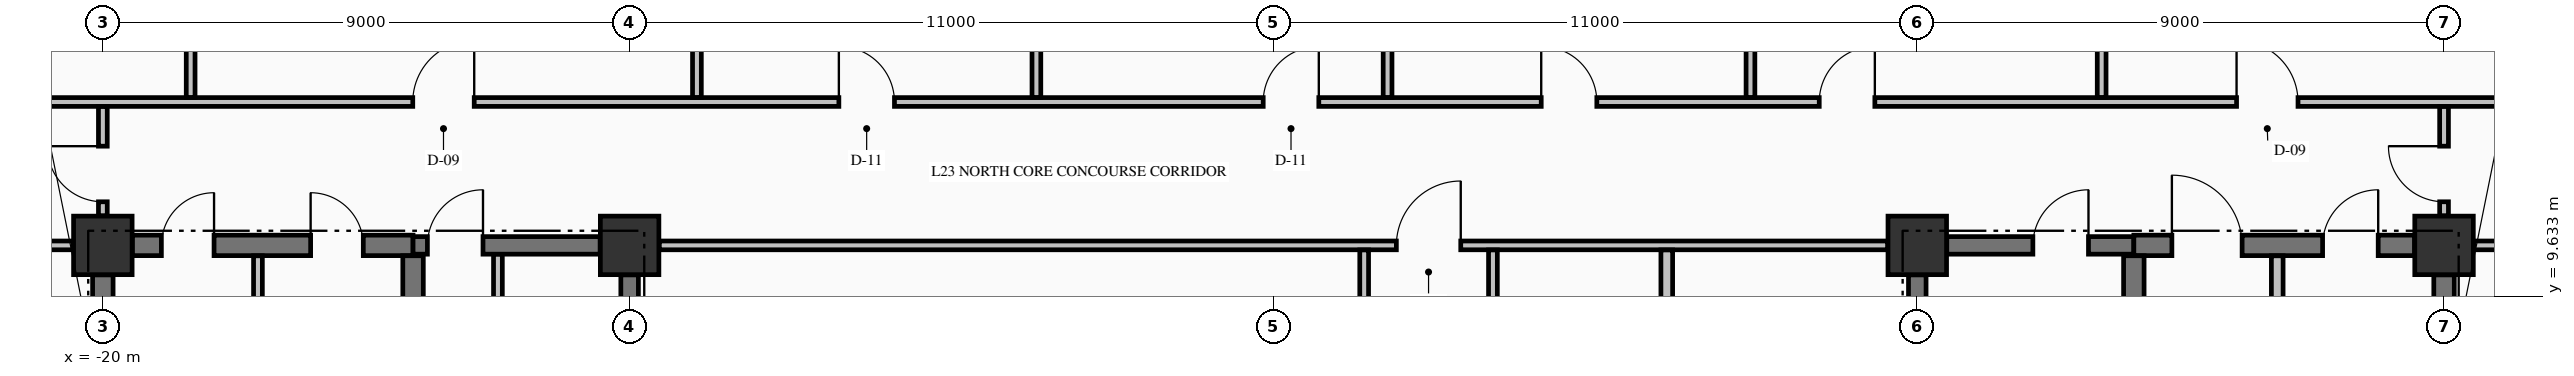
"""IFC4 building model, lengths in metres.
Left out: names, types, materials, properties, quantities, classifications, styles, units other than length and angle.
Written with IfcOpenShell. Run it as: python <this file> out.ifc"""

import sys

from ifc_helpers import new_model, si_unit, direction, frame, frame_2d, origin, origin_2d, place, context, subcontext, project, spatial, rectangle, extrude, element, fill, save


model = new_model("IFC4")
c1 = context("Model", 3, precision=1e-05, world=origin(), true_north=direction((0.0, 1.0)))
c2 = subcontext(c1, "Body", "Model", "MODEL_VIEW")
j1 = project(units=[si_unit("LENGTHUNIT", "METRE"), si_unit("PLANEANGLEUNIT", "RADIAN")], contexts=[c1])
p1 = place(None, origin())
s1 = spatial("IfcSite", under=j1, at=p1, CompositionType="ELEMENT")
p2 = place(p1, origin())
s2 = spatial("IfcBuilding", under=s1, at=p2, CompositionType="ELEMENT")
p3 = place(p2, frame((0.0, 0.0, 94.93)))
s3 = spatial("IfcBuildingStorey", under=s2, at=p3, CompositionType="ELEMENT", Elevation=94.93)
for number, where, z_axis, x_axis in (
    (1, (-20.0, 10.5, -0.25), (0.0, 0.0, 1.0), (1.0, 0.0, 0.0)),
    (2, (-11.0, 10.5, -0.25), (0.0, 0.0, 1.0), (1.0, 0.0, 0.0)),
    (3, (11.0, 10.5, -0.25), (0.0, 0.0, 1.0), (1.0, 0.0, 0.0)),
    (4, (20.0, 10.5, -0.25), (0.0, 0.0, 1.0), (1.0, 0.0, 0.0)),
):
    element("IfcColumn", number, at=place(p3, frame(where, z_axis=z_axis, x_axis=x_axis)), inside=s3, PredefinedType="COLUMN", context=c2, shape_type="SweptSolid", body=[
        extrude(rectangle(XDim=1.0, YDim=1.0, at=origin_2d()), origin(), (0.0, 0.0, 1.0), 3.545),
    ])
p4 = place(p3, frame((-19.496, 10.5, 0.0), z_axis=(0.0, 0.0, 1.0), x_axis=(1.0, 0.0, 0.0)))
e5 = element("IfcWall", 5, at=p4, inside=s3, PredefinedType="SHEAR", context=c2, shape_type="SweptSolid", body=[
    extrude(rectangle(XDim=4.796, YDim=0.35, at=frame_2d((2.398, 0.0))), origin(), (0.0, 0.0, 1.0), 3.295),
])
p5 = place(p4, frame((0.496, 0.0, 0.0)))
e6 = element("IfcOpeningElement", 6, at=p5, cuts=e5, PredefinedType="OPENING", context=c2, shape_type="SweptSolid", body=[
    extrude(rectangle(XDim=0.9, YDim=2.15, at=frame_2d((0.45, 1.075))), frame((0.0, 0.185, 0.0), z_axis=(0.0, -1.0, 0.0), x_axis=(1.0, 0.0, 0.0)), (0.0, 0.0, 1.0), 0.37),
])
p6 = place(p4, frame((3.046, 0.0, 0.0)))
e7 = element("IfcOpeningElement", 7, at=p6, cuts=e5, PredefinedType="OPENING", context=c2, shape_type="SweptSolid", body=[
    extrude(rectangle(XDim=0.9, YDim=2.15, at=frame_2d((0.45, 1.075))), frame((0.0, 0.185, 0.0), z_axis=(0.0, -1.0, 0.0), x_axis=(1.0, 0.0, 0.0)), (0.0, 0.0, 1.0), 0.37),
])
p7 = place(p3, frame((-14.7, 10.5, 0.0), z_axis=(0.0, 0.0, 1.0), x_axis=(1.0, 0.0, 0.0)))
e8 = element("IfcWall", 8, at=p7, inside=s3, PredefinedType="SHEAR", context=c2, shape_type="SweptSolid", body=[
    extrude(rectangle(XDim=3.196, YDim=0.3, at=frame_2d((1.598, 0.0))), origin(), (0.0, 0.0, 1.0), 3.295),
])
p8 = place(p7, frame((0.245, 0.0, 0.0)))
e9 = element("IfcOpeningElement", 9, at=p8, cuts=e8, PredefinedType="OPENING", context=c2, shape_type="SweptSolid", body=[
    extrude(rectangle(XDim=0.95, YDim=2.15, at=frame_2d((0.475, 1.075))), frame((0.0, 0.16, 0.0), z_axis=(0.0, -1.0, 0.0), x_axis=(1.0, 0.0, 0.0)), (0.0, 0.0, 1.0), 0.32),
])
p9 = place(p3, frame((11.504, 10.5, 0.0), z_axis=(0.0, 0.0, 1.0), x_axis=(1.0, 0.0, 0.0)))
e10 = element("IfcWall", 10, at=p9, inside=s3, PredefinedType="SHEAR", context=c2, shape_type="SweptSolid", body=[
    extrude(rectangle(XDim=3.196, YDim=0.3, at=frame_2d((1.598, 0.0))), origin(), (0.0, 0.0, 1.0), 3.295),
])
p10 = place(p9, frame((1.471, 0.0, 0.0)))
e11 = element("IfcOpeningElement", 11, at=p10, cuts=e10, PredefinedType="OPENING", context=c2, shape_type="SweptSolid", body=[
    extrude(rectangle(XDim=0.95, YDim=2.15, at=frame_2d((0.475, 1.075))), frame((0.0, 0.16, 0.0), z_axis=(0.0, -1.0, 0.0), x_axis=(1.0, 0.0, 0.0)), (0.0, 0.0, 1.0), 0.32),
])
p11 = place(p3, frame((14.7, 10.5, 0.0), z_axis=(0.0, 0.0, 1.0), x_axis=(1.0, 0.0, 0.0)))
e12 = element("IfcWall", 12, at=p11, inside=s3, PredefinedType="SHEAR", context=c2, shape_type="SweptSolid", body=[
    extrude(rectangle(XDim=4.796, YDim=0.35, at=frame_2d((2.398, 0.0))), origin(), (0.0, 0.0, 1.0), 3.295),
])
p12 = place(p11, frame((0.65, 0.0, 0.0)))
e13 = element("IfcOpeningElement", 13, at=p12, cuts=e12, PredefinedType="OPENING", context=c2, shape_type="SweptSolid", body=[
    extrude(rectangle(XDim=1.2, YDim=2.15, at=frame_2d((0.6, 1.075))), frame((0.0, 0.185, 0.0), z_axis=(0.0, -1.0, 0.0), x_axis=(1.0, 0.0, 0.0)), (0.0, 0.0, 1.0), 0.37),
])
p13 = place(p11, frame((3.225, 0.0, 0.0)))
e14 = element("IfcOpeningElement", 14, at=p13, cuts=e12, PredefinedType="OPENING", context=c2, shape_type="SweptSolid", body=[
    extrude(rectangle(XDim=0.95, YDim=2.15, at=frame_2d((0.475, 1.075))), frame((0.0, 0.185, 0.0), z_axis=(0.0, -1.0, 0.0), x_axis=(1.0, 0.0, 0.0)), (0.0, 0.0, 1.0), 0.37),
])
p14 = place(p3, frame((-22.835, 10.5, 0.0), z_axis=(0.0, 0.0, 1.0), x_axis=(1.0, 0.0, 0.0)))
e15 = element("IfcWall", 15, at=p14, inside=s3, PredefinedType="PARTITIONING", context=c2, shape_type="SweptSolid", body=[
    extrude(rectangle(XDim=2.329, YDim=0.15, at=frame_2d((1.165, 0.0))), origin(), (0.0, 0.0, 1.0), 3.295),
])
p15 = place(p14, frame((0.835, 0.0, 0.0)))
e16 = element("IfcOpeningElement", 16, at=p15, cuts=e15, PredefinedType="OPENING", context=c2, shape_type="SweptSolid", body=[
    extrude(rectangle(XDim=1.0, YDim=2.15, at=frame_2d((0.5, 1.075))), frame((0.0, 0.085, 0.0), z_axis=(0.0, -1.0, 0.0), x_axis=(1.0, 0.0, 0.0)), (0.0, 0.0, 1.0), 0.17),
])
p16 = place(p3, frame((-10.494, 10.5, 0.0), z_axis=(0.0, 0.0, 1.0), x_axis=(1.0, 0.0, 0.0)))
e17 = element("IfcWall", 17, at=p16, inside=s3, PredefinedType="PARTITIONING", context=c2, shape_type="SweptSolid", body=[
    extrude(rectangle(XDim=20.988, YDim=0.15, at=frame_2d((10.494, 0.0))), origin(), (0.0, 0.0, 1.0), 3.295),
])
p17 = place(p16, frame((12.594, 0.0, 0.0)))
e18 = element("IfcOpeningElement", 18, at=p17, cuts=e17, PredefinedType="OPENING", context=c2, shape_type="SweptSolid", body=[
    extrude(rectangle(XDim=1.1, YDim=2.15, at=frame_2d((0.55, 1.075))), frame((0.0, 0.085, 0.0), z_axis=(0.0, -1.0, 0.0), x_axis=(1.0, 0.0, 0.0)), (0.0, 0.0, 1.0), 0.17),
])
p18 = place(p3, frame((20.506, 10.5, 0.0), z_axis=(0.0, 0.0, 1.0), x_axis=(1.0, 0.0, 0.0)))
e19 = element("IfcWall", 19, at=p18, inside=s3, PredefinedType="PARTITIONING", context=c2, shape_type="SweptSolid", body=[
    extrude(rectangle(XDim=7.329, YDim=0.15, at=frame_2d((3.665, 0.0))), origin(), (0.0, 0.0, 1.0), 3.295),
])
p19 = place(p18, frame((3.019, 0.0, 0.0)))
e20 = element("IfcOpeningElement", 20, at=p19, cuts=e19, PredefinedType="OPENING", context=c2, shape_type="SweptSolid", body=[
    extrude(rectangle(XDim=0.95, YDim=2.15, at=frame_2d((0.475, 1.075))), frame((0.0, 0.085, 0.0), z_axis=(0.0, -1.0, 0.0), x_axis=(1.0, 0.0, 0.0)), (0.0, 0.0, 1.0), 0.17),
])
p20 = place(p3, frame((-22.835, 12.95, 0.0), z_axis=(0.0, 0.0, 1.0), x_axis=(1.0, 0.0, 0.0)))
e21 = element("IfcWall", 21, at=p20, inside=s3, PredefinedType="PARTITIONING", context=c2, shape_type="SweptSolid", body=[
    extrude(rectangle(XDim=50.67, YDim=0.15, at=frame_2d((25.335, 0.0))), origin(), (0.0, 0.0, 1.0), 3.295),
])
p21 = place(p20, frame((8.13, 0.0, 0.0)))
e22 = element("IfcOpeningElement", 22, at=p21, cuts=e21, PredefinedType="OPENING", context=c2, shape_type="SweptSolid", body=[
    extrude(rectangle(XDim=1.05, YDim=2.15, at=frame_2d((0.525, 1.075))), frame((0.0, 0.085, 0.0), z_axis=(0.0, -1.0, 0.0), x_axis=(1.0, 0.0, 0.0)), (0.0, 0.0, 1.0), 0.17),
])
p22 = place(p20, frame((15.41, 0.0, 0.0)))
e23 = element("IfcOpeningElement", 23, at=p22, cuts=e21, PredefinedType="OPENING", context=c2, shape_type="SweptSolid", body=[
    extrude(rectangle(XDim=0.95, YDim=2.15, at=frame_2d((0.475, 1.075))), frame((0.0, 0.085, 0.0), z_axis=(0.0, -1.0, 0.0), x_axis=(1.0, 0.0, 0.0)), (0.0, 0.0, 1.0), 0.17),
])
p23 = place(p20, frame((22.66, 0.0, 0.0)))
e24 = element("IfcOpeningElement", 24, at=p23, cuts=e21, PredefinedType="OPENING", context=c2, shape_type="SweptSolid", body=[
    extrude(rectangle(XDim=0.95, YDim=2.15, at=frame_2d((0.475, 1.075))), frame((0.0, 0.085, 0.0), z_axis=(0.0, -1.0, 0.0), x_axis=(1.0, 0.0, 0.0)), (0.0, 0.0, 1.0), 0.17),
])
p24 = place(p20, frame((27.41, 0.0, 0.0)))
e25 = element("IfcOpeningElement", 25, at=p24, cuts=e21, PredefinedType="OPENING", context=c2, shape_type="SweptSolid", body=[
    extrude(rectangle(XDim=0.95, YDim=2.15, at=frame_2d((0.475, 1.075))), frame((0.0, 0.085, 0.0), z_axis=(0.0, -1.0, 0.0), x_axis=(1.0, 0.0, 0.0)), (0.0, 0.0, 1.0), 0.17),
])
p25 = place(p20, frame((32.16, 0.0, 0.0)))
e26 = element("IfcOpeningElement", 26, at=p25, cuts=e21, PredefinedType="OPENING", context=c2, shape_type="SweptSolid", body=[
    extrude(rectangle(XDim=0.95, YDim=2.15, at=frame_2d((0.475, 1.075))), frame((0.0, 0.085, 0.0), z_axis=(0.0, -1.0, 0.0), x_axis=(1.0, 0.0, 0.0)), (0.0, 0.0, 1.0), 0.17),
])
p26 = place(p20, frame((39.29, 0.0, 0.0)))
e27 = element("IfcOpeningElement", 27, at=p26, cuts=e21, PredefinedType="OPENING", context=c2, shape_type="SweptSolid", body=[
    extrude(rectangle(XDim=1.05, YDim=2.15, at=frame_2d((0.525, 1.075))), frame((0.0, 0.085, 0.0), z_axis=(0.0, -1.0, 0.0), x_axis=(1.0, 0.0, 0.0)), (0.0, 0.0, 1.0), 0.17),
])
p27 = place(p3, frame((-20.0, 0.504, 0.0), z_axis=(0.0, 0.0, 1.0), x_axis=(0.0, 1.0, 0.0)))
e28 = element("IfcWall", 28, at=p27, inside=s3, PredefinedType="SHEAR", context=c2, shape_type="SweptSolid", body=[
    extrude(rectangle(XDim=9.492, YDim=0.35, at=frame_2d((4.746, 0.0))), origin(), (0.0, 0.0, 1.0), 3.295),
])
p28 = place(p3, frame((-14.7, 5.852, 0.0), z_axis=(0.0, 0.0, 1.0), x_axis=(0.0, 1.0, 0.0)))
e29 = element("IfcWall", 29, at=p28, inside=s3, PredefinedType="SHEAR", context=c2, shape_type="SweptSolid", body=[
    extrude(rectangle(XDim=4.471, YDim=0.35, at=frame_2d((2.235, 0.0))), origin(), (0.0, 0.0, 1.0), 3.295),
])
for number, where, z_axis, x_axis in (
    (30, (-11.0, 5.852, 0.0), (0.0, 0.0, 1.0), (0.0, 1.0, 0.0)),
    (31, (11.0, 5.852, 0.0), (0.0, 0.0, 1.0), (0.0, 1.0, 0.0)),
):
    element("IfcWall", number, at=place(p3, frame(where, z_axis=z_axis, x_axis=x_axis)), inside=s3, PredefinedType="SHEAR", context=c2, shape_type="SweptSolid", body=[
        extrude(rectangle(XDim=4.144, YDim=0.3, at=frame_2d((2.072, 0.0))), origin(), (0.0, 0.0, 1.0), 3.295),
    ])
p29 = place(p3, frame((14.7, 5.852, 0.0), z_axis=(0.0, 0.0, 1.0), x_axis=(0.0, 1.0, 0.0)))
e32 = element("IfcWall", 32, at=p29, inside=s3, PredefinedType="SHEAR", context=c2, shape_type="SweptSolid", body=[
    extrude(rectangle(XDim=4.471, YDim=0.35, at=frame_2d((2.235, 0.0))), origin(), (0.0, 0.0, 1.0), 3.295),
])
p30 = place(p3, frame((20.0, 5.377, 0.0), z_axis=(0.0, 0.0, 1.0), x_axis=(0.0, 1.0, 0.0)))
e33 = element("IfcWall", 33, at=p30, inside=s3, PredefinedType="SHEAR", context=c2, shape_type="SweptSolid", body=[
    extrude(rectangle(XDim=4.619, YDim=0.35, at=frame_2d((2.31, 0.0))), origin(), (0.0, 0.0, 1.0), 3.295),
])
p31 = place(p3, frame((-20.0, 11.006, 0.0), z_axis=(0.0, 0.0, 1.0), x_axis=(0.0, 1.0, 0.0)))
e34 = element("IfcWall", 34, at=p31, inside=s3, PredefinedType="PARTITIONING", context=c2, shape_type="SweptSolid", body=[
    extrude(rectangle(XDim=1.866, YDim=0.15, at=frame_2d((0.933, 0.0))), origin(), (0.0, 0.0, 1.0), 2.785),
])
p32 = place(p31, frame((0.239, 0.0, 0.0)))
e35 = element("IfcOpeningElement", 35, at=p32, cuts=e34, PredefinedType="OPENING", context=c2, shape_type="SweptSolid", body=[
    extrude(rectangle(XDim=0.95, YDim=2.15, at=frame_2d((0.475, 1.075))), frame((0.0, 0.085, 0.0), z_axis=(0.0, -1.0, 0.0), x_axis=(1.0, 0.0, 0.0)), (0.0, 0.0, 1.0), 0.17),
])
p33 = place(p3, frame((-18.5, 13.028, 0.0), z_axis=(0.0, 0.0, 1.0), x_axis=(0.0, 1.0, 0.0)))
e36 = element("IfcWall", 36, at=p33, inside=s3, PredefinedType="PARTITIONING", context=c2, shape_type="SweptSolid", body=[
    extrude(rectangle(XDim=7.366, YDim=0.15, at=frame_2d((3.683, 0.0))), origin(), (0.0, 0.0, 1.0), 3.295),
])
p34 = place(p3, frame((-17.35, -0.097, 0.0), z_axis=(0.0, 0.0, 1.0), x_axis=(0.0, 1.0, 0.0)))
e37 = element("IfcWall", 37, at=p34, inside=s3, PredefinedType="PARTITIONING", context=c2, shape_type="SweptSolid", body=[
    extrude(rectangle(XDim=10.419, YDim=0.15, at=frame_2d((5.209, 0.0))), origin(), (0.0, 0.0, 1.0), 3.295),
])
p35 = place(p3, frame((-13.25, 5.853, 0.0), z_axis=(0.0, 0.0, 1.0), x_axis=(0.0, 1.0, 0.0)))
e38 = element("IfcWall", 38, at=p35, inside=s3, PredefinedType="PARTITIONING", context=c2, shape_type="SweptSolid", body=[
    extrude(rectangle(XDim=4.494, YDim=0.15, at=frame_2d((2.247, 0.0))), origin(), (0.0, 0.0, 1.0), 3.295),
])
p36 = place(p35, frame((1.472, 0.0, 0.0)))
e39 = element("IfcOpeningElement", 39, at=p36, cuts=e38, PredefinedType="OPENING", context=c2, shape_type="SweptSolid", body=[
    extrude(rectangle(XDim=0.95, YDim=2.15, at=frame_2d((0.475, 1.075))), frame((0.0, 0.085, 0.0), z_axis=(0.0, -1.0, 0.0), x_axis=(1.0, 0.0, 0.0)), (0.0, 0.0, 1.0), 0.17),
])
for number, where, z_axis, x_axis in (
    (40, (-9.85, 13.028, 0.0), (0.0, 0.0, 1.0), (0.0, 1.0, 0.0)),
    (41, (-4.05, 13.028, 0.0), (0.0, 0.0, 1.0), (0.0, 1.0, 0.0)),
):
    element("IfcWall", number, at=place(p3, frame(where, z_axis=z_axis, x_axis=x_axis)), inside=s3, PredefinedType="PARTITIONING", context=c2, shape_type="SweptSolid", body=[
        extrude(rectangle(XDim=12.307, YDim=0.15, at=frame_2d((6.153, 0.0))), origin(), (0.0, 0.0, 1.0), 3.295),
    ])
p37 = place(p3, frame((1.55, 2.978, 0.0), z_axis=(0.0, 0.0, 1.0), x_axis=(0.0, 1.0, 0.0)))
e42 = element("IfcWall", 42, at=p37, inside=s3, PredefinedType="PARTITIONING", context=c2, shape_type="SweptSolid", body=[
    extrude(rectangle(XDim=7.444, YDim=0.15, at=frame_2d((3.722, 0.0))), origin(), (0.0, 0.0, 1.0), 3.295),
])
p38 = place(p3, frame((1.95, 13.028, 0.0), z_axis=(0.0, 0.0, 1.0), x_axis=(0.0, 1.0, 0.0)))
e43 = element("IfcWall", 43, at=p38, inside=s3, PredefinedType="PARTITIONING", context=c2, shape_type="SweptSolid", body=[
    extrude(rectangle(XDim=12.307, YDim=0.15, at=frame_2d((6.153, 0.0))), origin(), (0.0, 0.0, 1.0), 3.295),
])
p39 = place(p3, frame((3.75, 2.978, 0.0), z_axis=(0.0, 0.0, 1.0), x_axis=(0.0, 1.0, 0.0)))
e44 = element("IfcWall", 44, at=p39, inside=s3, PredefinedType="PARTITIONING", context=c2, shape_type="SweptSolid", body=[
    extrude(rectangle(XDim=7.444, YDim=0.15, at=frame_2d((3.722, 0.0))), origin(), (0.0, 0.0, 1.0), 3.295),
])
p40 = place(p3, frame((6.72, 2.978, 0.0), z_axis=(0.0, 0.0, 1.0), x_axis=(0.0, 1.0, 0.0)))
e45 = element("IfcWall", 45, at=p40, inside=s3, PredefinedType="PARTITIONING", context=c2, shape_type="SweptSolid", body=[
    extrude(rectangle(XDim=7.444, YDim=0.2, at=frame_2d((3.722, 0.0))), origin(), (0.0, 0.0, 1.0), 3.295),
])
for number, where, z_axis, x_axis in (
    (46, (8.15, 13.028, 0.0), (0.0, 0.0, 1.0), (0.0, 1.0, 0.0)),
    (47, (14.15, 13.028, 0.0), (0.0, 0.0, 1.0), (0.0, 1.0, 0.0)),
):
    element("IfcWall", number, at=place(p3, frame(where, z_axis=z_axis, x_axis=x_axis)), inside=s3, PredefinedType="PARTITIONING", context=c2, shape_type="SweptSolid", body=[
        extrude(rectangle(XDim=12.307, YDim=0.15, at=frame_2d((6.153, 0.0))), origin(), (0.0, 0.0, 1.0), 3.295),
    ])
p41 = place(p3, frame((17.15, 7.928, 0.0), z_axis=(0.0, 0.0, 1.0), x_axis=(0.0, 1.0, 0.0)))
e48 = element("IfcWall", 48, at=p41, inside=s3, PredefinedType="PARTITIONING", context=c2, shape_type="SweptSolid", body=[
    extrude(rectangle(XDim=2.394, YDim=0.2, at=frame_2d((1.197, 0.0))), origin(), (0.0, 0.0, 1.0), 3.295),
])
p42 = place(p3, frame((20.0, 11.006, 0.0), z_axis=(0.0, 0.0, 1.0), x_axis=(0.0, 1.0, 0.0)))
e49 = element("IfcWall", 49, at=p42, inside=s3, PredefinedType="PARTITIONING", context=c2, shape_type="SweptSolid", body=[
    extrude(rectangle(XDim=1.866, YDim=0.15, at=frame_2d((0.933, 0.0))), origin(), (0.0, 0.0, 1.0), 2.785),
])
p43 = place(p42, frame((0.239, 0.0, 0.0)))
e50 = element("IfcOpeningElement", 50, at=p43, cuts=e49, PredefinedType="OPENING", context=c2, shape_type="SweptSolid", body=[
    extrude(rectangle(XDim=0.95, YDim=2.15, at=frame_2d((0.475, 1.075))), frame((0.0, 0.085, 0.0), z_axis=(0.0, -1.0, 0.0), x_axis=(1.0, 0.0, 0.0)), (0.0, 0.0, 1.0), 0.17),
])
p44 = place(p8, origin())
e51 = element("IfcDoor", 51, at=p44, inside=s3, OperationType="SINGLE_SWING_RIGHT", PredefinedType="DOOR", context=c2, shape_type="SweptSolid", body=[
    extrude(rectangle(XDim=0.95, YDim=2.15, at=frame_2d((0.475, 1.075))), frame((0.0, 0.025, 0.0), z_axis=(0.0, -1.0, 0.0), x_axis=(1.0, 0.0, 0.0)), (0.0, 0.0, 1.0), 0.05),
])
fill(e9, e51)
p45 = place(p10, origin())
e52 = element("IfcDoor", 52, at=p45, inside=s3, OperationType="SINGLE_SWING_RIGHT", PredefinedType="DOOR", context=c2, shape_type="SweptSolid", body=[
    extrude(rectangle(XDim=0.95, YDim=2.15, at=frame_2d((0.475, 1.075))), frame((0.0, 0.025, 0.0), z_axis=(0.0, -1.0, 0.0), x_axis=(1.0, 0.0, 0.0)), (0.0, 0.0, 1.0), 0.05),
])
fill(e11, e52)
p46 = place(p5, origin())
e53 = element("IfcDoor", 53, at=p46, inside=s3, OperationType="SINGLE_SWING_RIGHT", PredefinedType="DOOR", context=c2, shape_type="SweptSolid", body=[
    extrude(rectangle(XDim=0.9, YDim=2.15, at=frame_2d((0.45, 1.075))), frame((0.0, 0.025, 0.0), z_axis=(0.0, -1.0, 0.0), x_axis=(1.0, 0.0, 0.0)), (0.0, 0.0, 1.0), 0.05),
])
fill(e6, e53)
p47 = place(p6, origin())
e54 = element("IfcDoor", 54, at=p47, inside=s3, OperationType="SINGLE_SWING_LEFT", PredefinedType="DOOR", context=c2, shape_type="SweptSolid", body=[
    extrude(rectangle(XDim=0.9, YDim=2.15, at=frame_2d((0.45, 1.075))), frame((0.0, 0.025, 0.0), z_axis=(0.0, -1.0, 0.0), x_axis=(1.0, 0.0, 0.0)), (0.0, 0.0, 1.0), 0.05),
])
fill(e7, e54)
p48 = place(p12, origin())
e55 = element("IfcDoor", 55, at=p48, inside=s3, OperationType="SINGLE_SWING_LEFT", PredefinedType="DOOR", context=c2, shape_type="SweptSolid", body=[
    extrude(rectangle(XDim=1.2, YDim=2.15, at=frame_2d((0.6, 1.075))), frame((0.0, 0.025, 0.0), z_axis=(0.0, -1.0, 0.0), x_axis=(1.0, 0.0, 0.0)), (0.0, 0.0, 1.0), 0.05),
])
fill(e13, e55)
p49 = place(p13, origin())
e56 = element("IfcDoor", 56, at=p49, inside=s3, OperationType="SINGLE_SWING_RIGHT", PredefinedType="DOOR", context=c2, shape_type="SweptSolid", body=[
    extrude(rectangle(XDim=0.95, YDim=2.15, at=frame_2d((0.475, 1.075))), frame((0.0, 0.025, 0.0), z_axis=(0.0, -1.0, 0.0), x_axis=(1.0, 0.0, 0.0)), (0.0, 0.0, 1.0), 0.05),
])
fill(e14, e56)
p50 = place(p17, origin())
e57 = element("IfcDoor", 57, at=p50, inside=s3, OperationType="SINGLE_SWING_RIGHT", PredefinedType="DOOR", context=c2, shape_type="SweptSolid", body=[
    extrude(rectangle(XDim=1.1, YDim=2.15, at=frame_2d((0.55, 1.075))), frame((0.0, 0.025, 0.0), z_axis=(0.0, -1.0, 0.0), x_axis=(1.0, 0.0, 0.0)), (0.0, 0.0, 1.0), 0.05),
])
fill(e18, e57)
p51 = place(p21, origin())
e58 = element("IfcDoor", 58, at=p51, inside=s3, OperationType="SINGLE_SWING_RIGHT", PredefinedType="DOOR", context=c2, shape_type="SweptSolid", body=[
    extrude(rectangle(XDim=1.05, YDim=2.15, at=frame_2d((0.525, 1.075))), frame((0.0, 0.025, 0.0), z_axis=(0.0, -1.0, 0.0), x_axis=(1.0, 0.0, 0.0)), (0.0, 0.0, 1.0), 0.05),
])
fill(e22, e58)
p52 = place(p22, origin())
e59 = element("IfcDoor", 59, at=p52, inside=s3, OperationType="SINGLE_SWING_LEFT", PredefinedType="DOOR", context=c2, shape_type="SweptSolid", body=[
    extrude(rectangle(XDim=0.95, YDim=2.15, at=frame_2d((0.475, 1.075))), frame((0.0, 0.025, 0.0), z_axis=(0.0, -1.0, 0.0), x_axis=(1.0, 0.0, 0.0)), (0.0, 0.0, 1.0), 0.05),
])
fill(e23, e59)
p53 = place(p23, origin())
e60 = element("IfcDoor", 60, at=p53, inside=s3, OperationType="SINGLE_SWING_RIGHT", PredefinedType="DOOR", context=c2, shape_type="SweptSolid", body=[
    extrude(rectangle(XDim=0.95, YDim=2.15, at=frame_2d((0.475, 1.075))), frame((0.0, 0.025, 0.0), z_axis=(0.0, -1.0, 0.0), x_axis=(1.0, 0.0, 0.0)), (0.0, 0.0, 1.0), 0.05),
])
fill(e24, e60)
p54 = place(p24, origin())
e61 = element("IfcDoor", 61, at=p54, inside=s3, OperationType="SINGLE_SWING_LEFT", PredefinedType="DOOR", context=c2, shape_type="SweptSolid", body=[
    extrude(rectangle(XDim=0.95, YDim=2.15, at=frame_2d((0.475, 1.075))), frame((0.0, 0.025, 0.0), z_axis=(0.0, -1.0, 0.0), x_axis=(1.0, 0.0, 0.0)), (0.0, 0.0, 1.0), 0.05),
])
fill(e25, e61)
p55 = place(p25, origin())
e62 = element("IfcDoor", 62, at=p55, inside=s3, OperationType="SINGLE_SWING_RIGHT", PredefinedType="DOOR", context=c2, shape_type="SweptSolid", body=[
    extrude(rectangle(XDim=0.95, YDim=2.15, at=frame_2d((0.475, 1.075))), frame((0.0, 0.025, 0.0), z_axis=(0.0, -1.0, 0.0), x_axis=(1.0, 0.0, 0.0)), (0.0, 0.0, 1.0), 0.05),
])
fill(e26, e62)
p56 = place(p26, origin())
e63 = element("IfcDoor", 63, at=p56, inside=s3, OperationType="SINGLE_SWING_LEFT", PredefinedType="DOOR", context=c2, shape_type="SweptSolid", body=[
    extrude(rectangle(XDim=1.05, YDim=2.15, at=frame_2d((0.525, 1.075))), frame((0.0, 0.025, 0.0), z_axis=(0.0, -1.0, 0.0), x_axis=(1.0, 0.0, 0.0)), (0.0, 0.0, 1.0), 0.05),
])
fill(e27, e63)
p57 = place(p32, origin())
e64 = element("IfcDoor", 64, at=p57, inside=s3, OperationType="SINGLE_SWING_RIGHT", PredefinedType="DOOR", context=c2, shape_type="SweptSolid", body=[
    extrude(rectangle(XDim=0.95, YDim=2.15, at=frame_2d((0.475, 1.075))), frame((0.0, 0.025, 0.0), z_axis=(0.0, -1.0, 0.0), x_axis=(1.0, 0.0, 0.0)), (0.0, 0.0, 1.0), 0.05),
])
fill(e35, e64)
p58 = place(p43, origin())
e65 = element("IfcDoor", 65, at=p58, inside=s3, OperationType="SINGLE_SWING_RIGHT", PredefinedType="DOOR", context=c2, shape_type="SweptSolid", body=[
    extrude(rectangle(XDim=0.95, YDim=2.15, at=frame_2d((0.475, 1.075))), frame((0.0, 0.025, 0.0), z_axis=(0.0, -1.0, 0.0), x_axis=(1.0, 0.0, 0.0)), (0.0, 0.0, 1.0), 0.05),
])
fill(e50, e65)
save(model, sys.argv[1])
